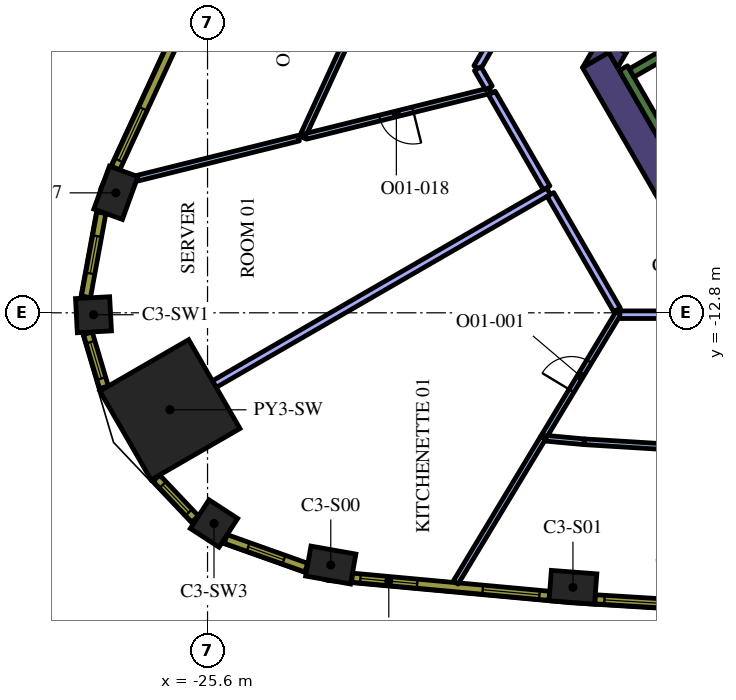
"""IFC4 building model, lengths in metres.
Left out: names, types, materials, properties, quantities, classifications, styles, units other than length and angle.
Written with IfcOpenShell. Run it as: python <this file> out.ifc"""

import sys

from ifc_helpers import new_model, si_unit, direction, frame, frame_2d, origin, origin_2d, place, context, subcontext, project, spatial, polyline, rectangle, outline, extrude, element, fill, save


model = new_model("IFC4")
c1 = context("Model", 3, precision=1e-05, world=origin(), true_north=direction((0.0, 1.0)))
c2 = subcontext(c1, "Body", "Model", "MODEL_VIEW")
j1 = project(units=[si_unit("LENGTHUNIT", "METRE"), si_unit("PLANEANGLEUNIT", "RADIAN")], contexts=[c1])
p1 = place(None, origin())
s1 = spatial("IfcSite", under=j1, at=p1, CompositionType="ELEMENT")
p2 = place(p1, origin())
s2 = spatial("IfcBuilding", under=s1, at=p2, CompositionType="ELEMENT")
p3 = place(p2, frame((0.0, 0.0, 145.8)))
s3 = spatial("IfcBuildingStorey", under=s2, at=p3, CompositionType="ELEMENT", Elevation=145.8)
p4 = place(p3, frame((-26.591, -15.352, 0.0), z_axis=(0.0, 0.0, 1.0), x_axis=(-0.866025403784, -0.5, 0.0)))
e1 = element("IfcColumn", 1, at=p4, inside=s3, PredefinedType="COLUMN", context=c2, shape_type="SweptSolid", body=[
    extrude(rectangle(XDim=2.7, YDim=2.7, at=origin_2d()), origin(), (0.0, 0.0, 1.0), 4.2),
])
for number, where, z_axis, x_axis in (
    (2, (-22.357, -19.437, 0.0), (0.0, 0.0, 1.0), (0.985, -0.175, 0.0)),
    (3, (-15.985, -20.022, 0.0), (0.0, 0.0, 1.0), (0.997, -0.076, 0.0)),
    (4, (-28.012, -9.644, 0.0), (0.0, 0.0, 1.0), (-0.341, -0.94, 0.0)),
):
    element("IfcColumn", number, at=place(p3, frame(where, z_axis=z_axis, x_axis=x_axis)), inside=s3, PredefinedType="COLUMN", context=c2, shape_type="SweptSolid", body=[
        extrude(rectangle(XDim=1.2, YDim=0.8, at=origin_2d()), origin(), (0.0, 0.0, 1.0), 4.2),
    ])
for number, where, z_axis, x_axis in (
    (5, (-28.601, -12.851, 0.0), (0.0, 0.0, 1.0), (0.053, -0.999, 0.0)),
    (6, (-25.43, -18.344, 0.0), (0.0, 0.0, 1.0), (0.838, -0.546, 0.0)),
):
    element("IfcColumn", number, at=place(p3, frame(where, z_axis=z_axis, x_axis=x_axis)), inside=s3, PredefinedType="COLUMN", context=c2, shape_type="SweptSolid", body=[
        extrude(rectangle(XDim=0.9, YDim=0.9, at=origin_2d()), origin(), (0.0, 0.0, 1.0), 4.2),
    ])
p5 = place(p3, origin())
e7 = element("IfcWall", 7, at=p5, inside=s3, PredefinedType="SOLIDWALL", context=c2, shape_type="SweptSolid", body=[
    extrude(outline(polyline([(-13.828, -9.65), (-13.38, -9.65), (-13.38, -10.426), (-13.828, -9.65)])), origin(), (0.0, 0.0, 1.0), 4.2),
])
p6 = place(p3, frame((-15.387, -6.148, 0.0), z_axis=(0.0, 0.0, 1.0), x_axis=(0.499984020225, -0.866034629516, 0.0)))
e8 = element("IfcWall", 8, at=p6, inside=s3, PredefinedType="SOLIDWALL", context=c2, shape_type="SweptSolid", body=[
    extrude(rectangle(XDim=3.824, YDim=0.8, at=frame_2d((1.912, 0.0))), origin(), (0.0, 0.0, 1.0), 4.2),
])
e9 = element("IfcWall", 9, at=p5, inside=s3, PredefinedType="SOLIDWALL", context=c2, shape_type="SweptSolid", body=[
    extrude(outline(polyline([(-15.042, -5.947), (-15.729, -6.343), (-15.271, -5.55), (-15.042, -5.947)])), origin(), (0.0, 0.0, 1.0), 4.2),
])
e10 = element("IfcWall", 10, at=p5, inside=s3, PredefinedType="SOLIDWALL", context=c2, shape_type="SweptSolid", body=[
    extrude(outline(polyline([(-12.904, -9.65), (-13.8, -9.65), (-13.128, -9.262), (-12.904, -9.65)])), origin(), (0.0, 0.0, 1.0), 4.2),
])
p7 = place(p3, frame((-13.518, -3.314, 0.0), z_axis=(0.0, 0.0, 1.0), x_axis=(-0.499969377405, -0.866043083026, 0.0)))
e11 = element("IfcWall", 11, at=p7, inside=s3, PredefinedType="SOLIDWALL", context=c2, shape_type="SweptSolid", body=[
    extrude(rectangle(XDim=2.824, YDim=0.8, at=frame_2d((1.412, 0.0))), origin(), (0.0, 0.0, 1.0), 4.2),
])
e12 = element("IfcWall", 12, at=p5, inside=s3, PredefinedType="SOLIDWALL", context=c2, shape_type="SweptSolid", body=[
    extrude(outline(polyline([(-14.809, -6.35), (-15.257, -5.574), (-14.585, -5.962), (-14.809, -6.35)])), origin(), (0.0, 0.0, 1.0), 4.2),
])
p8 = place(p3, frame((-12.84, -9.511, 0.0), z_axis=(0.0, 0.0, 1.0), x_axis=(-0.499997733992, 0.866026712061, 0.0)))
e13 = element("IfcWall", 13, at=p8, inside=s3, PredefinedType="SOLIDWALL", context=c2, shape_type="SweptSolid", body=[
    extrude(rectangle(XDim=3.634, YDim=0.25, at=frame_2d((1.817, 0.0))), origin(), (0.0, 0.0, 1.0), 4.2),
])
p9 = place(p3, frame((-14.44, -6.49, 0.0), z_axis=(0.0, 0.0, 1.0), x_axis=(0.866022966069, 0.500004222222, 0.0)))
e14 = element("IfcWall", 14, at=p9, inside=s3, PredefinedType="SOLIDWALL", context=c2, shape_type="SweptSolid", body=[
    extrude(rectangle(XDim=6.8, YDim=0.25, at=frame_2d((3.4, 0.0))), origin(), (0.0, 0.0, 1.0), 4.2),
])
p10 = place(p3, frame((-16.771, -16.09, 0.0), z_axis=(0.0, 0.0, 1.0), x_axis=(-0.516817512045, -0.856095590015, 0.0)))
e15 = element("IfcWall", 15, at=p10, inside=s3, PredefinedType="PARTITIONING", context=c2, shape_type="SweptSolid", body=[
    extrude(rectangle(XDim=4.45, YDim=0.15, at=frame_2d((2.225, 0.0))), origin(), (0.0, 0.0, 1.0), 3.15),
])
p11 = place(p3, frame((-16.775, -16.097, 0.0), z_axis=(0.0, 0.0, 1.0), x_axis=(0.516793803756, 0.856109902057, 0.0)))
e16 = element("IfcWall", 16, at=p11, inside=s3, PredefinedType="PARTITIONING", context=c2, shape_type="SweptSolid", body=[
    extrude(rectangle(XDim=3.856, YDim=0.15, at=frame_2d((1.928, 0.0))), origin(), (0.0, 0.0, 1.0), 3.15),
])
p12 = place(p11, frame((1.456, 0.0, 0.0)))
e17 = element("IfcOpeningElement", 17, at=p12, cuts=e16, PredefinedType="OPENING", context=c2, shape_type="SweptSolid", body=[
    extrude(rectangle(XDim=0.9, YDim=2.1, at=frame_2d((0.45, 1.05))), frame((0.0, 0.085, 0.0), z_axis=(0.0, -1.0, 0.0), x_axis=(1.0, 0.0, 0.0)), (0.0, 0.0, 1.0), 0.17),
])
p13 = place(p3, frame((-25.421, -14.677, 0.0), z_axis=(0.0, 0.0, 1.0), x_axis=(0.866031435434, 0.499989552732, 0.0)))
e18 = element("IfcWall", 18, at=p13, inside=s3, PredefinedType="PARTITIONING", context=c2, shape_type="SweptSolid", body=[
    extrude(rectangle(XDim=10.154, YDim=0.2, at=frame_2d((5.077, 0.0))), origin(), (0.0, 0.0, 1.0), 3.15),
])
p14 = place(p3, frame((-16.578, -9.687, 0.0), z_axis=(0.0, 0.0, 1.0), x_axis=(0.499981686864, -0.86603597662, 0.0)))
e19 = element("IfcWall", 19, at=p14, inside=s3, PredefinedType="PARTITIONING", context=c2, shape_type="SweptSolid", body=[
    extrude(rectangle(XDim=3.506, YDim=0.2, at=frame_2d((1.753, 0.0))), origin(), (0.0, 0.0, 1.0), 3.15),
])
p15 = place(p3, frame((-16.69, -16.102, 0.0), z_axis=(0.0, 0.0, 1.0), x_axis=(0.995818997537, -0.091348366946, 0.0)))
e20 = element("IfcWall", 20, at=p15, inside=s3, PredefinedType="PARTITIONING", context=c2, shape_type="SweptSolid", body=[
    extrude(rectangle(XDim=1.002, YDim=0.15, at=frame_2d((0.501, 0.0))), origin(), (0.0, 0.0, 1.0), 3.15),
])
p16 = place(p3, frame((-9.421, -16.576, 0.0), z_axis=(0.0, 0.0, 1.0), x_axis=(-0.998137075468, 0.061011298754, 0.0)))
e21 = element("IfcWall", 21, at=p16, inside=s3, PredefinedType="PARTITIONING", context=c2, shape_type="SweptSolid", body=[
    extrude(rectangle(XDim=6.282, YDim=0.15, at=frame_2d((3.141, 0.0))), origin(), (0.0, 0.0, 1.0), 3.15),
])
p17 = place(p16, frame((2.683, 0.0, 0.0)))
e22 = element("IfcOpeningElement", 22, at=p17, cuts=e21, PredefinedType="OPENING", context=c2, shape_type="SweptSolid", body=[
    extrude(rectangle(XDim=0.9, YDim=2.1, at=frame_2d((0.45, 1.05))), frame((0.0, 0.085, 0.0), z_axis=(0.0, -1.0, 0.0), x_axis=(1.0, 0.0, 0.0)), (0.0, 0.0, 1.0), 0.17),
])
p18 = place(p3, frame((-14.751, -12.85, 0.0), z_axis=(0.0, 0.0, 1.0), x_axis=(1.0, 0.0, 0.0)))
e23 = element("IfcWall", 23, at=p18, inside=s3, PredefinedType="PARTITIONING", context=c2, shape_type="SweptSolid", body=[
    extrude(rectangle(XDim=9.721, YDim=0.2, at=frame_2d((4.861, 0.0))), origin(), (0.0, 0.0, 1.0), 3.15),
])
p19 = place(p3, frame((-21.869, -5.493, 0.0), z_axis=(0.0, 0.0, 1.0), x_axis=(-0.418791486232, -0.908082425256, 0.0)))
e24 = element("IfcWall", 24, at=p19, inside=s3, PredefinedType="PARTITIONING", context=c2, shape_type="SweptSolid", body=[
    extrude(rectangle(XDim=2.961, YDim=0.15, at=frame_2d((1.48, 0.0))), origin(), (0.0, 0.0, 1.0), 3.15),
])
p20 = place(p3, frame((-23.203, -8.205, 0.0), z_axis=(0.0, 0.0, 1.0), x_axis=(-0.970525493326, -0.240998478843, 0.0)))
e25 = element("IfcWall", 25, at=p20, inside=s3, PredefinedType="PARTITIONING", context=c2, shape_type="SweptSolid", body=[
    extrude(rectangle(XDim=4.373, YDim=0.15, at=frame_2d((2.187, 0.0))), origin(), (0.0, 0.0, 1.0), 3.15),
])
p21 = place(p3, frame((-18.156, -6.952, 0.0), z_axis=(0.0, 0.0, 1.0), x_axis=(-0.97052275783, -0.241009494697, 0.0)))
e26 = element("IfcWall", 26, at=p21, inside=s3, PredefinedType="PARTITIONING", context=c2, shape_type="SweptSolid", body=[
    extrude(rectangle(XDim=5.007, YDim=0.15, at=frame_2d((2.504, 0.0))), origin(), (0.0, 0.0, 1.0), 3.15),
])
p22 = place(p21, frame((2.1, 0.0, 0.0)))
e27 = element("IfcOpeningElement", 27, at=p22, cuts=e26, PredefinedType="OPENING", context=c2, shape_type="SweptSolid", body=[
    extrude(rectangle(XDim=0.9, YDim=2.1, at=frame_2d((0.45, 1.05))), frame((0.0, 0.085, 0.0), z_axis=(0.0, -1.0, 0.0), x_axis=(1.0, 0.0, 0.0)), (0.0, 0.0, 1.0), 0.17),
])
p23 = place(p3, frame((-13.643, 2.069, 0.0), z_axis=(0.0, 0.0, 1.0), x_axis=(-0.500012305324, -0.866018299186, 0.0)))
e28 = element("IfcWall", 28, at=p23, inside=s3, PredefinedType="PARTITIONING", context=c2, shape_type="SweptSolid", body=[
    extrude(rectangle(XDim=9.721, YDim=0.2, at=frame_2d((4.861, 0.0))), origin(), (0.0, 0.0, 1.0), 3.15),
])
p24 = place(p3, frame((-18.489, -6.376, 0.0), z_axis=(0.0, 0.0, 1.0), x_axis=(0.499986503906, -0.866033195618, 0.0)))
e29 = element("IfcWall", 29, at=p24, inside=s3, PredefinedType="PARTITIONING", context=c2, shape_type="SweptSolid", body=[
    extrude(rectangle(XDim=0.587, YDim=0.2, at=frame_2d((0.293, 0.0))), origin(), (0.0, 0.0, 1.0), 3.15),
])
p25 = place(p3, frame((-18.118, -7.02, 0.0), z_axis=(0.0, 0.0, 1.0), x_axis=(0.500023335103, -0.866011930837, 0.0)))
e30 = element("IfcWall", 30, at=p25, inside=s3, PredefinedType="PARTITIONING", context=c2, shape_type="SweptSolid", body=[
    extrude(rectangle(XDim=2.88, YDim=0.2, at=frame_2d((1.44, 0.0))), origin(), (0.0, 0.0, 1.0), 3.15),
])
p26 = place(p3, frame((-21.797, -19.77, 0.0), z_axis=(0.0, 0.0, 1.0), x_axis=(0.995808712151, -0.091460422067, 0.0)))
e31 = element("IfcWall", 31, at=p26, inside=s3, PredefinedType="SOLIDWALL", context=c2, shape_type="SweptSolid", body=[
    extrude(rectangle(XDim=5.213, YDim=0.24, at=frame_2d((2.606, 0.0))), origin(), (0.0, 0.0, 1.0), 3.95),
])
p27 = place(p26, frame((0.221, 0.0, 0.9)))
e32 = element("IfcOpeningElement", 32, at=p27, cuts=e31, PredefinedType="OPENING", context=c2, shape_type="SweptSolid", body=[
    extrude(rectangle(XDim=1.5, YDim=2.55, at=frame_2d((0.75, 1.275))), frame((0.0, 0.13, 0.0), z_axis=(0.0, -1.0, 0.0), x_axis=(1.0, 0.0, 0.0)), (0.0, 0.0, 1.0), 0.26),
])
p28 = place(p26, frame((3.452, 0.0, 0.9)))
e33 = element("IfcOpeningElement", 33, at=p28, cuts=e31, PredefinedType="OPENING", context=c2, shape_type="SweptSolid", body=[
    extrude(rectangle(XDim=1.5, YDim=2.55, at=frame_2d((0.75, 1.275))), frame((0.0, 0.13, 0.0), z_axis=(0.0, -1.0, 0.0), x_axis=(1.0, 0.0, 0.0)), (0.0, 0.0, 1.0), 0.26),
])
p29 = place(p3, frame((-15.405, -20.338, 0.0), z_axis=(0.0, 0.0, 1.0), x_axis=(0.998135294646, -0.061040425794, 0.0)))
e34 = element("IfcWall", 34, at=p29, inside=s3, PredefinedType="SOLIDWALL", context=c2, shape_type="SweptSolid", body=[
    extrude(rectangle(XDim=5.204, YDim=0.24, at=frame_2d((2.602, 0.0))), origin(), (0.0, 0.0, 1.0), 3.95),
])
p30 = place(p29, frame((0.248, 0.0, 0.9)))
e35 = element("IfcOpeningElement", 35, at=p30, cuts=e34, PredefinedType="OPENING", context=c2, shape_type="SweptSolid", body=[
    extrude(rectangle(XDim=1.5, YDim=2.55, at=frame_2d((0.75, 1.275))), frame((0.0, 0.13, 0.0), z_axis=(0.0, -1.0, 0.0), x_axis=(1.0, 0.0, 0.0)), (0.0, 0.0, 1.0), 0.26),
])
p31 = place(p29, frame((3.455, 0.0, 0.9)))
e36 = element("IfcOpeningElement", 36, at=p31, cuts=e34, PredefinedType="OPENING", context=c2, shape_type="SweptSolid", body=[
    extrude(rectangle(XDim=1.5, YDim=2.55, at=frame_2d((0.75, 1.275))), frame((0.0, 0.13, 0.0), z_axis=(0.0, -1.0, 0.0), x_axis=(1.0, 0.0, 0.0)), (0.0, 0.0, 1.0), 0.26),
])
p32 = place(p3, frame((-25.837, -4.258, 0.0), z_axis=(0.0, 0.0, 1.0), x_axis=(-0.418722559465, -0.908114209885, 0.0)))
e37 = element("IfcWall", 37, at=p32, inside=s3, PredefinedType="SOLIDWALL", context=c2, shape_type="SweptSolid", body=[
    extrude(rectangle(XDim=5.213, YDim=0.24, at=frame_2d((2.606, 0.0))), origin(), (0.0, 0.0, 1.0), 3.95),
])
p33 = place(p32, frame((0.261, 0.0, 0.9)))
e38 = element("IfcOpeningElement", 38, at=p33, cuts=e37, PredefinedType="OPENING", context=c2, shape_type="SweptSolid", body=[
    extrude(rectangle(XDim=1.5, YDim=2.55, at=frame_2d((0.75, 1.275))), frame((0.0, 0.13, 0.0), z_axis=(0.0, -1.0, 0.0), x_axis=(1.0, 0.0, 0.0)), (0.0, 0.0, 1.0), 0.26),
])
p34 = place(p32, frame((3.492, 0.0, 0.9)))
e39 = element("IfcOpeningElement", 39, at=p34, cuts=e37, PredefinedType="OPENING", context=c2, shape_type="SweptSolid", body=[
    extrude(rectangle(XDim=1.5, YDim=2.55, at=frame_2d((0.75, 1.275))), frame((0.0, 0.13, 0.0), z_axis=(0.0, -1.0, 0.0), x_axis=(1.0, 0.0, 0.0)), (0.0, 0.0, 1.0), 0.26),
])
p35 = place(p3, frame((-28.393, -10.167, 0.0), z_axis=(0.0, 0.0, 1.0), x_axis=(-0.180737189259, -0.983531427265, 0.0)))
e40 = element("IfcWall", 40, at=p35, inside=s3, PredefinedType="SOLIDWALL", context=c2, shape_type="SweptSolid", body=[
    extrude(rectangle(XDim=2.25, YDim=0.24, at=frame_2d((1.125, 0.0))), origin(), (0.0, 0.0, 1.0), 3.95),
])
p36 = place(p35, frame((0.625, 0.0, 0.9)))
e41 = element("IfcOpeningElement", 41, at=p36, cuts=e40, PredefinedType="OPENING", context=c2, shape_type="SweptSolid", body=[
    extrude(rectangle(XDim=1.0, YDim=2.55, at=frame_2d((0.5, 1.275))), frame((0.0, 0.13, 0.0), z_axis=(0.0, -1.0, 0.0), x_axis=(1.0, 0.0, 0.0)), (0.0, 0.0, 1.0), 0.26),
])
p37 = place(p3, frame((-28.748, -13.34, 0.0), z_axis=(0.0, 0.0, 1.0), x_axis=(0.284413721403, -0.958701640281, 0.0)))
e42 = element("IfcWall", 42, at=p37, inside=s3, PredefinedType="SOLIDWALL", context=c2, shape_type="SweptSolid", body=[
    extrude(rectangle(XDim=1.482, YDim=0.24, at=frame_2d((0.741, 0.0))), origin(), (0.0, 0.0, 1.0), 3.95),
])
p38 = place(p37, frame((0.241, 0.0, 0.9)))
e43 = element("IfcOpeningElement", 43, at=p38, cuts=e42, PredefinedType="OPENING", context=c2, shape_type="SweptSolid", body=[
    extrude(rectangle(XDim=1.0, YDim=2.55, at=frame_2d((0.5, 1.275))), frame((0.0, 0.13, 0.0), z_axis=(0.0, -1.0, 0.0), x_axis=(1.0, 0.0, 0.0)), (0.0, 0.0, 1.0), 0.26),
])
p39 = place(p3, frame((-26.946, -17.151, 0.0), z_axis=(0.0, 0.0, 1.0), x_axis=(0.687986858937, -0.725723144133, 0.0)))
e44 = element("IfcWall", 44, at=p39, inside=s3, PredefinedType="SOLIDWALL", context=c2, shape_type="SweptSolid", body=[
    extrude(rectangle(XDim=1.481, YDim=0.24, at=frame_2d((0.741, 0.0))), origin(), (0.0, 0.0, 1.0), 3.95),
])
p40 = place(p39, frame((0.241, 0.0, 0.9)))
e45 = element("IfcOpeningElement", 45, at=p40, cuts=e44, PredefinedType="OPENING", context=c2, shape_type="SweptSolid", body=[
    extrude(rectangle(XDim=1.0, YDim=2.55, at=frame_2d((0.5, 1.275))), frame((0.0, 0.13, 0.0), z_axis=(0.0, -1.0, 0.0), x_axis=(1.0, 0.0, 0.0)), (0.0, 0.0, 1.0), 0.26),
])
p41 = place(p3, frame((-25.121, -18.751, 0.0), z_axis=(0.0, 0.0, 1.0), x_axis=(0.942099727267, -0.335332825539, 0.0)))
e46 = element("IfcWall", 46, at=p41, inside=s3, PredefinedType="SOLIDWALL", context=c2, shape_type="SweptSolid", body=[
    extrude(rectangle(XDim=2.25, YDim=0.24, at=frame_2d((1.125, 0.0))), origin(), (0.0, 0.0, 1.0), 3.95),
])
p42 = place(p41, frame((0.625, 0.0, 0.9)))
e47 = element("IfcOpeningElement", 47, at=p42, cuts=e46, PredefinedType="OPENING", context=c2, shape_type="SweptSolid", body=[
    extrude(rectangle(XDim=1.0, YDim=2.55, at=frame_2d((0.5, 1.275))), frame((0.0, 0.13, 0.0), z_axis=(0.0, -1.0, 0.0), x_axis=(1.0, 0.0, 0.0)), (0.0, 0.0, 1.0), 0.26),
])
p43 = place(p12, origin())
e48 = element("IfcDoor", 48, at=p43, inside=s3, OperationType="SINGLE_SWING_LEFT", PredefinedType="DOOR", context=c2, shape_type="SweptSolid", body=[
    extrude(rectangle(XDim=0.9, YDim=2.1, at=frame_2d((0.45, 1.05))), frame((0.0, 0.025, 0.0), z_axis=(0.0, -1.0, 0.0), x_axis=(1.0, 0.0, 0.0)), (0.0, 0.0, 1.0), 0.05),
])
fill(e17, e48)
p44 = place(p22, origin())
e49 = element("IfcDoor", 49, at=p44, inside=s3, OperationType="SINGLE_SWING_RIGHT", PredefinedType="DOOR", context=c2, shape_type="SweptSolid", body=[
    extrude(rectangle(XDim=0.9, YDim=2.1, at=frame_2d((0.45, 1.05))), frame((0.0, 0.025, 0.0), z_axis=(0.0, -1.0, 0.0), x_axis=(1.0, 0.0, 0.0)), (0.0, 0.0, 1.0), 0.05),
])
fill(e27, e49)
p45 = place(p27, origin())
e50 = element("IfcWindow", 50, at=p45, inside=s3, PartitioningType="SINGLE_PANEL", PredefinedType="WINDOW", context=c2, shape_type="SweptSolid", body=[
    extrude(rectangle(XDim=1.5, YDim=2.55, at=frame_2d((0.75, 1.275))), frame((0.0, 0.04, 0.0), z_axis=(0.0, -1.0, 0.0), x_axis=(1.0, 0.0, 0.0)), (0.0, 0.0, 1.0), 0.06),
])
fill(e32, e50)
p46 = place(p28, origin())
e51 = element("IfcWindow", 51, at=p46, inside=s3, PartitioningType="SINGLE_PANEL", PredefinedType="WINDOW", context=c2, shape_type="SweptSolid", body=[
    extrude(rectangle(XDim=1.5, YDim=2.55, at=frame_2d((0.75, 1.275))), frame((0.0, 0.04, 0.0), z_axis=(0.0, -1.0, 0.0), x_axis=(1.0, 0.0, 0.0)), (0.0, 0.0, 1.0), 0.06),
])
fill(e33, e51)
p47 = place(p30, origin())
e52 = element("IfcWindow", 52, at=p47, inside=s3, PartitioningType="SINGLE_PANEL", PredefinedType="WINDOW", context=c2, shape_type="SweptSolid", body=[
    extrude(rectangle(XDim=1.5, YDim=2.55, at=frame_2d((0.75, 1.275))), frame((0.0, 0.04, 0.0), z_axis=(0.0, -1.0, 0.0), x_axis=(1.0, 0.0, 0.0)), (0.0, 0.0, 1.0), 0.06),
])
fill(e35, e52)
p48 = place(p34, origin())
e53 = element("IfcWindow", 53, at=p48, inside=s3, PartitioningType="SINGLE_PANEL", PredefinedType="WINDOW", context=c2, shape_type="SweptSolid", body=[
    extrude(rectangle(XDim=1.5, YDim=2.55, at=frame_2d((0.75, 1.275))), frame((0.0, 0.04, 0.0), z_axis=(0.0, -1.0, 0.0), x_axis=(1.0, 0.0, 0.0)), (0.0, 0.0, 1.0), 0.06),
])
fill(e39, e53)
p49 = place(p36, origin())
e54 = element("IfcWindow", 54, at=p49, inside=s3, PartitioningType="SINGLE_PANEL", PredefinedType="WINDOW", context=c2, shape_type="SweptSolid", body=[
    extrude(rectangle(XDim=1.0, YDim=2.55, at=frame_2d((0.5, 1.275))), frame((0.0, 0.04, 0.0), z_axis=(0.0, -1.0, 0.0), x_axis=(1.0, 0.0, 0.0)), (0.0, 0.0, 1.0), 0.06),
])
fill(e41, e54)
p50 = place(p38, origin())
e55 = element("IfcWindow", 55, at=p50, inside=s3, PartitioningType="SINGLE_PANEL", PredefinedType="WINDOW", context=c2, shape_type="SweptSolid", body=[
    extrude(rectangle(XDim=1.0, YDim=2.55, at=frame_2d((0.5, 1.275))), frame((0.0, 0.04, 0.0), z_axis=(0.0, -1.0, 0.0), x_axis=(1.0, 0.0, 0.0)), (0.0, 0.0, 1.0), 0.06),
])
fill(e43, e55)
p51 = place(p40, origin())
e56 = element("IfcWindow", 56, at=p51, inside=s3, PartitioningType="SINGLE_PANEL", PredefinedType="WINDOW", context=c2, shape_type="SweptSolid", body=[
    extrude(rectangle(XDim=1.0, YDim=2.55, at=frame_2d((0.5, 1.275))), frame((0.0, 0.04, 0.0), z_axis=(0.0, -1.0, 0.0), x_axis=(1.0, 0.0, 0.0)), (0.0, 0.0, 1.0), 0.06),
])
fill(e45, e56)
p52 = place(p42, origin())
e57 = element("IfcWindow", 57, at=p52, inside=s3, PartitioningType="SINGLE_PANEL", PredefinedType="WINDOW", context=c2, shape_type="SweptSolid", body=[
    extrude(rectangle(XDim=1.0, YDim=2.55, at=frame_2d((0.5, 1.275))), frame((0.0, 0.04, 0.0), z_axis=(0.0, -1.0, 0.0), x_axis=(1.0, 0.0, 0.0)), (0.0, 0.0, 1.0), 0.06),
])
fill(e47, e57)
save(model, sys.argv[1])
